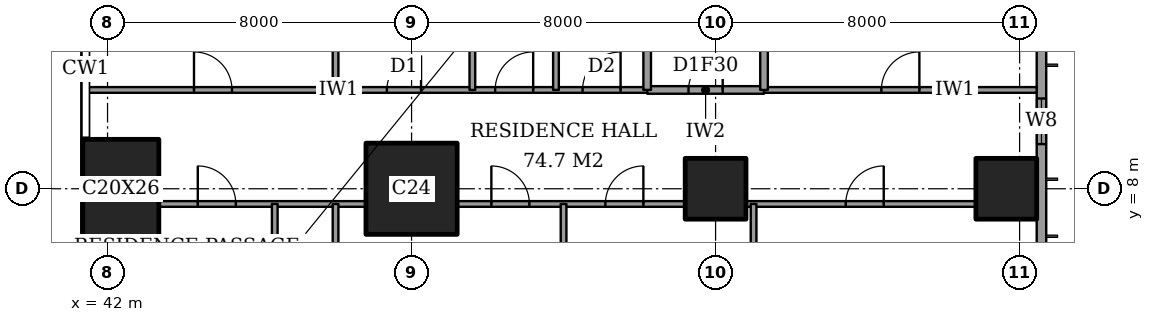
"""IFC4 building model, lengths in metres.
Left out: names, types, materials, properties, quantities, classifications, styles, units other than length and angle.
Written with IfcOpenShell. Run it as: python <this file> out.ifc"""

import sys

from ifc_helpers import new_model, si_unit, direction, frame, frame_2d, origin, origin_2d, place, context, subcontext, project, spatial, rectangle, extrude, element, fill, save


model = new_model("IFC4")
c1 = context("Model", 3, precision=1e-05, world=origin(), true_north=direction((0.0, 1.0)))
c2 = subcontext(c1, "Body", "Model", "MODEL_VIEW")
j1 = project(units=[si_unit("LENGTHUNIT", "METRE"), si_unit("PLANEANGLEUNIT", "RADIAN")], contexts=[c1])
p1 = place(None, origin())
s1 = spatial("IfcSite", under=j1, at=p1, CompositionType="ELEMENT")
p2 = place(p1, origin())
s2 = spatial("IfcBuilding", under=s1, at=p2, CompositionType="ELEMENT")
p3 = place(p2, frame((0.0, 0.0, 262.8)))
s3 = spatial("IfcBuildingStorey", under=s2, at=p3, CompositionType="ELEMENT", Elevation=262.8)
p4 = place(p3, frame((42.35, 8.0, 0.0), z_axis=(0.0, 0.0, 1.0), x_axis=(1.0, 0.0, 0.0)))
e1 = element("IfcColumn", 1, at=p4, inside=s3, PredefinedType="COLUMN", context=c2, shape_type="SweptSolid", body=[
    extrude(rectangle(XDim=2.0, YDim=2.6, at=origin_2d()), origin(), (0.0, 0.0, 1.0), 3.6),
])
p5 = place(p3, frame((50.0, 8.0, 0.0), z_axis=(0.0, 0.0, 1.0), x_axis=(1.0, 0.0, 0.0)))
e2 = element("IfcColumn", 2, at=p5, inside=s3, PredefinedType="COLUMN", context=c2, shape_type="SweptSolid", body=[
    extrude(rectangle(XDim=2.4, YDim=2.4, at=origin_2d()), origin(), (0.0, 0.0, 1.0), 3.6),
])
for number, where, z_axis, x_axis in (
    (3, (58.0, 8.0, 0.0), (0.0, 0.0, 1.0), (1.0, 0.0, 0.0)),
    (4, (65.65, 8.0, 0.0), (0.0, 0.0, 1.0), (1.0, 0.0, 0.0)),
):
    element("IfcColumn", number, at=place(p3, frame(where, z_axis=z_axis, x_axis=x_axis)), inside=s3, PredefinedType="COLUMN", context=c2, shape_type="SweptSolid", body=[
        extrude(rectangle(XDim=1.6, YDim=1.6, at=origin_2d()), origin(), (0.0, 0.0, 1.0), 3.6),
    ])
p6 = place(p3, frame((66.575, 3.175, 0.0), z_axis=(0.0, 0.0, 1.0), x_axis=(0.0, 1.0, 0.0)))
e5 = element("IfcWall", 5, at=p6, inside=s3, PredefinedType="SOLIDWALL", context=c2, shape_type="SweptSolid", body=[
    extrude(rectangle(XDim=41.65, YDim=0.25, at=frame_2d((20.825, 0.0))), origin(), (0.0, 0.0, 1.0), 3.6),
])
p7 = place(p6, frame((0.875, 0.0, 0.6)))
e6 = element("IfcOpeningElement", 6, at=p7, cuts=e5, PredefinedType="OPENING", context=c2, shape_type="SweptSolid", body=[
    extrude(rectangle(XDim=2.4, YDim=2.0, at=frame_2d((1.2, 1.0))), frame((0.0, 0.135, 0.0), z_axis=(0.0, -1.0, 0.0), x_axis=(1.0, 0.0, 0.0)), (0.0, 0.0, 1.0), 0.27),
])
p8 = place(p6, frame((6.0, 0.0, 0.6)))
e7 = element("IfcOpeningElement", 7, at=p8, cuts=e5, PredefinedType="OPENING", context=c2, shape_type="SweptSolid", body=[
    extrude(rectangle(XDim=1.2, YDim=2.0, at=frame_2d((0.6, 1.0))), frame((0.0, 0.135, 0.0), z_axis=(0.0, -1.0, 0.0), x_axis=(1.0, 0.0, 0.0)), (0.0, 0.0, 1.0), 0.27),
])
p9 = place(p6, frame((8.525, 0.0, 0.6)))
e8 = element("IfcOpeningElement", 8, at=p9, cuts=e5, PredefinedType="OPENING", context=c2, shape_type="SweptSolid", body=[
    extrude(rectangle(XDim=2.4, YDim=2.0, at=frame_2d((1.2, 1.0))), frame((0.0, 0.135, 0.0), z_axis=(0.0, -1.0, 0.0), x_axis=(1.0, 0.0, 0.0)), (0.0, 0.0, 1.0), 0.27),
])
p10 = place(p6, frame((15.625, 0.0, 0.6)))
e9 = element("IfcOpeningElement", 9, at=p10, cuts=e5, PredefinedType="OPENING", context=c2, shape_type="SweptSolid", body=[
    extrude(rectangle(XDim=2.4, YDim=2.0, at=frame_2d((1.2, 1.0))), frame((0.0, 0.135, 0.0), z_axis=(0.0, -1.0, 0.0), x_axis=(1.0, 0.0, 0.0)), (0.0, 0.0, 1.0), 0.27),
])
p11 = place(p6, frame((23.525, 0.0, 0.6)))
e10 = element("IfcOpeningElement", 10, at=p11, cuts=e5, PredefinedType="OPENING", context=c2, shape_type="SweptSolid", body=[
    extrude(rectangle(XDim=2.4, YDim=2.0, at=frame_2d((1.2, 1.0))), frame((0.0, 0.135, 0.0), z_axis=(0.0, -1.0, 0.0), x_axis=(1.0, 0.0, 0.0)), (0.0, 0.0, 1.0), 0.27),
])
p12 = place(p6, frame((30.625, 0.0, 0.6)))
e11 = element("IfcOpeningElement", 11, at=p12, cuts=e5, PredefinedType="OPENING", context=c2, shape_type="SweptSolid", body=[
    extrude(rectangle(XDim=2.4, YDim=2.0, at=frame_2d((1.2, 1.0))), frame((0.0, 0.135, 0.0), z_axis=(0.0, -1.0, 0.0), x_axis=(1.0, 0.0, 0.0)), (0.0, 0.0, 1.0), 0.27),
])
p13 = place(p6, frame((34.325, 0.0, 0.6)))
e12 = element("IfcOpeningElement", 12, at=p13, cuts=e5, PredefinedType="OPENING", context=c2, shape_type="SweptSolid", body=[
    extrude(rectangle(XDim=1.2, YDim=2.0, at=frame_2d((0.6, 1.0))), frame((0.0, 0.135, 0.0), z_axis=(0.0, -1.0, 0.0), x_axis=(1.0, 0.0, 0.0)), (0.0, 0.0, 1.0), 0.27),
])
p14 = place(p6, frame((38.375, 0.0, 0.6)))
e13 = element("IfcOpeningElement", 13, at=p14, cuts=e5, PredefinedType="OPENING", context=c2, shape_type="SweptSolid", body=[
    extrude(rectangle(XDim=2.4, YDim=2.0, at=frame_2d((1.2, 1.0))), frame((0.0, 0.135, 0.0), z_axis=(0.0, -1.0, 0.0), x_axis=(1.0, 0.0, 0.0)), (0.0, 0.0, 1.0), 0.27),
])
p15 = place(p3, frame((43.35, 7.6, 0.0), z_axis=(0.0, 0.0, 1.0), x_axis=(1.0, 0.0, 0.0)))
e14 = element("IfcWall", 14, at=p15, inside=s3, PredefinedType="PARTITIONING", context=c2, shape_type="SweptSolid", body=[
    extrude(rectangle(XDim=5.45, YDim=0.15, at=frame_2d((2.725, 0.0))), origin(), (0.0, 0.0, 1.0), 3.35),
])
p16 = place(p15, frame((1.025, 0.0, 0.0)))
e15 = element("IfcOpeningElement", 15, at=p16, cuts=e14, PredefinedType="OPENING", context=c2, shape_type="SweptSolid", body=[
    extrude(rectangle(XDim=1.0, YDim=2.1, at=frame_2d((0.5, 1.05))), frame((0.0, 0.085, 0.0), z_axis=(0.0, -1.0, 0.0), x_axis=(1.0, 0.0, 0.0)), (0.0, 0.0, 1.0), 0.17),
])
p17 = place(p3, frame((51.2, 7.6, 0.0), z_axis=(0.0, 0.0, 1.0), x_axis=(1.0, 0.0, 0.0)))
e16 = element("IfcWall", 16, at=p17, inside=s3, PredefinedType="PARTITIONING", context=c2, shape_type="SweptSolid", body=[
    extrude(rectangle(XDim=6.0, YDim=0.15, at=frame_2d((3.0, 0.0))), origin(), (0.0, 0.0, 1.0), 3.35),
])
p18 = place(p17, frame((3.9, 0.0, 0.0)))
e17 = element("IfcOpeningElement", 17, at=p18, cuts=e16, PredefinedType="OPENING", context=c2, shape_type="SweptSolid", body=[
    extrude(rectangle(XDim=1.0, YDim=2.1, at=frame_2d((0.5, 1.05))), frame((0.0, 0.085, 0.0), z_axis=(0.0, -1.0, 0.0), x_axis=(1.0, 0.0, 0.0)), (0.0, 0.0, 1.0), 0.17),
])
p19 = place(p17, frame((0.9, 0.0, 0.0)))
e18 = element("IfcOpeningElement", 18, at=p19, cuts=e16, PredefinedType="OPENING", context=c2, shape_type="SweptSolid", body=[
    extrude(rectangle(XDim=1.0, YDim=2.1, at=frame_2d((0.5, 1.05))), frame((0.0, 0.085, 0.0), z_axis=(0.0, -1.0, 0.0), x_axis=(1.0, 0.0, 0.0)), (0.0, 0.0, 1.0), 0.17),
])
p20 = place(p3, frame((58.8, 7.6, 0.0), z_axis=(0.0, 0.0, 1.0), x_axis=(1.0, 0.0, 0.0)))
e19 = element("IfcWall", 19, at=p20, inside=s3, PredefinedType="PARTITIONING", context=c2, shape_type="SweptSolid", body=[
    extrude(rectangle(XDim=6.05, YDim=0.15, at=frame_2d((3.025, 0.0))), origin(), (0.0, 0.0, 1.0), 3.35),
])
p21 = place(p20, frame((2.625, 0.0, 0.0)))
e20 = element("IfcOpeningElement", 20, at=p21, cuts=e19, PredefinedType="OPENING", context=c2, shape_type="SweptSolid", body=[
    extrude(rectangle(XDim=1.0, YDim=2.1, at=frame_2d((0.5, 1.05))), frame((0.0, 0.085, 0.0), z_axis=(0.0, -1.0, 0.0), x_axis=(1.0, 0.0, 0.0)), (0.0, 0.0, 1.0), 0.17),
])
p22 = place(p3, frame((56.2, 10.6, 0.0), z_axis=(0.0, 0.0, 1.0), x_axis=(1.0, 0.0, 0.0)))
e21 = element("IfcWall", 21, at=p22, inside=s3, PredefinedType="PARTITIONING", context=c2, shape_type="SweptSolid", body=[
    extrude(rectangle(XDim=3.075, YDim=0.2, at=frame_2d((1.538, 0.0))), origin(), (0.0, 0.0, 1.0), 3.35),
])
p23 = place(p22, frame((1.087, 0.0, 0.0)))
e22 = element("IfcOpeningElement", 22, at=p23, cuts=e21, PredefinedType="OPENING", context=c2, shape_type="SweptSolid", body=[
    extrude(rectangle(XDim=0.9, YDim=2.1, at=frame_2d((0.45, 1.05))), frame((0.0, 0.11, 0.0), z_axis=(0.0, -1.0, 0.0), x_axis=(1.0, 0.0, 0.0)), (0.0, 0.0, 1.0), 0.22),
])
p24 = place(p3, frame((41.439, 10.6, 0.0), z_axis=(0.0, 0.0, 1.0), x_axis=(1.0, 0.0, 0.0)))
e23 = element("IfcWall", 23, at=p24, inside=s3, PredefinedType="PARTITIONING", context=c2, shape_type="SweptSolid", body=[
    extrude(rectangle(XDim=14.761, YDim=0.15, at=frame_2d((7.38, 0.0))), origin(), (0.0, 0.0, 1.0), 3.35),
])
p25 = place(p24, frame((10.761, 0.0, 0.0)))
e24 = element("IfcOpeningElement", 24, at=p25, cuts=e23, PredefinedType="OPENING", context=c2, shape_type="SweptSolid", body=[
    extrude(rectangle(XDim=1.0, YDim=2.1, at=frame_2d((0.5, 1.05))), frame((0.0, 0.085, 0.0), z_axis=(0.0, -1.0, 0.0), x_axis=(1.0, 0.0, 0.0)), (0.0, 0.0, 1.0), 0.17),
])
p26 = place(p24, frame((13.061, 0.0, 0.0)))
e25 = element("IfcOpeningElement", 25, at=p26, cuts=e23, PredefinedType="OPENING", context=c2, shape_type="SweptSolid", body=[
    extrude(rectangle(XDim=1.0, YDim=2.1, at=frame_2d((0.5, 1.05))), frame((0.0, 0.085, 0.0), z_axis=(0.0, -1.0, 0.0), x_axis=(1.0, 0.0, 0.0)), (0.0, 0.0, 1.0), 0.17),
])
p27 = place(p24, frame((7.911, 0.0, 0.0)))
e26 = element("IfcOpeningElement", 26, at=p27, cuts=e23, PredefinedType="OPENING", context=c2, shape_type="SweptSolid", body=[
    extrude(rectangle(XDim=0.9, YDim=2.1, at=frame_2d((0.45, 1.05))), frame((0.0, 0.085, 0.0), z_axis=(0.0, -1.0, 0.0), x_axis=(1.0, 0.0, 0.0)), (0.0, 0.0, 1.0), 0.17),
])
p28 = place(p24, frame((2.836, 0.0, 0.0)))
e27 = element("IfcOpeningElement", 27, at=p28, cuts=e23, PredefinedType="OPENING", context=c2, shape_type="SweptSolid", body=[
    extrude(rectangle(XDim=1.0, YDim=2.1, at=frame_2d((0.5, 1.05))), frame((0.0, 0.085, 0.0), z_axis=(0.0, -1.0, 0.0), x_axis=(1.0, 0.0, 0.0)), (0.0, 0.0, 1.0), 0.17),
])
p29 = place(p3, frame((59.275, 10.6, 0.0), z_axis=(0.0, 0.0, 1.0), x_axis=(1.0, 0.0, 0.0)))
e28 = element("IfcWall", 28, at=p29, inside=s3, PredefinedType="PARTITIONING", context=c2, shape_type="SweptSolid", body=[
    extrude(rectangle(XDim=7.175, YDim=0.15, at=frame_2d((3.587, 0.0))), origin(), (0.0, 0.0, 1.0), 3.35),
])
p30 = place(p29, frame((3.087, 0.0, 0.0)))
e29 = element("IfcOpeningElement", 29, at=p30, cuts=e28, PredefinedType="OPENING", context=c2, shape_type="SweptSolid", body=[
    extrude(rectangle(XDim=1.0, YDim=2.1, at=frame_2d((0.5, 1.05))), frame((0.0, 0.085, 0.0), z_axis=(0.0, -1.0, 0.0), x_axis=(1.0, 0.0, 0.0)), (0.0, 0.0, 1.0), 0.17),
])
p31 = place(p3, frame((46.4, -0.45, 0.0), z_axis=(0.0, 0.0, 1.0), x_axis=(0.0, 1.0, 0.0)))
e30 = element("IfcWall", 30, at=p31, inside=s3, PredefinedType="PARTITIONING", context=c2, shape_type="SweptSolid", body=[
    extrude(rectangle(XDim=8.05, YDim=0.15, at=frame_2d((4.025, 0.0))), origin(), (0.0, 0.0, 1.0), 3.35),
])
p32 = place(p31, frame((3.575, 0.0, 0.0)))
e31 = element("IfcOpeningElement", 31, at=p32, cuts=e30, PredefinedType="OPENING", context=c2, shape_type="SweptSolid", body=[
    extrude(rectangle(XDim=0.9, YDim=2.1, at=frame_2d((0.45, 1.05))), frame((0.0, 0.085, 0.0), z_axis=(0.0, -1.0, 0.0), x_axis=(1.0, 0.0, 0.0)), (0.0, 0.0, 1.0), 0.17),
])
p33 = place(p3, frame((48.0, -0.45, 0.0), z_axis=(0.0, 0.0, 1.0), x_axis=(0.0, 1.0, 0.0)))
e32 = element("IfcWall", 32, at=p33, inside=s3, PredefinedType="PARTITIONING", context=c2, shape_type="SweptSolid", body=[
    extrude(rectangle(XDim=8.05, YDim=0.15, at=frame_2d((4.025, 0.0))), origin(), (0.0, 0.0, 1.0), 3.35),
])
for number, where, z_axis, x_axis in (
    (33, (48.0, 10.6, 0.0), (0.0, 0.0, 1.0), (0.0, 1.0, 0.0)),
    (34, (51.6, 10.6, 0.0), (0.0, 0.0, 1.0), (0.0, 1.0, 0.0)),
    (35, (53.8, 10.6, 0.0), (0.0, 0.0, 1.0), (0.0, 1.0, 0.0)),
):
    element("IfcWall", number, at=place(p3, frame(where, z_axis=z_axis, x_axis=x_axis)), inside=s3, PredefinedType="PARTITIONING", context=c2, shape_type="SweptSolid", body=[
        extrude(rectangle(XDim=5.9, YDim=0.15, at=frame_2d((2.95, 0.0))), origin(), (0.0, 0.0, 1.0), 3.35),
    ])
p34 = place(p3, frame((54.0, -0.45, 0.0), z_axis=(0.0, 0.0, 1.0), x_axis=(0.0, 1.0, 0.0)))
e36 = element("IfcWall", 36, at=p34, inside=s3, PredefinedType="PARTITIONING", context=c2, shape_type="SweptSolid", body=[
    extrude(rectangle(XDim=8.05, YDim=0.15, at=frame_2d((4.025, 0.0))), origin(), (0.0, 0.0, 1.0), 3.35),
])
p35 = place(p3, frame((56.2, 10.6, 0.0), z_axis=(0.0, 0.0, 1.0), x_axis=(0.0, 1.0, 0.0)))
e37 = element("IfcWall", 37, at=p35, inside=s3, PredefinedType="PARTITIONING", context=c2, shape_type="SweptSolid", body=[
    extrude(rectangle(XDim=3.2, YDim=0.2, at=frame_2d((1.6, 0.0))), origin(), (0.0, 0.0, 1.0), 3.35),
])
p36 = place(p3, frame((59.0, -0.45, 0.0), z_axis=(0.0, 0.0, 1.0), x_axis=(0.0, 1.0, 0.0)))
e38 = element("IfcWall", 38, at=p36, inside=s3, PredefinedType="PARTITIONING", context=c2, shape_type="SweptSolid", body=[
    extrude(rectangle(XDim=8.05, YDim=0.15, at=frame_2d((4.025, 0.0))), origin(), (0.0, 0.0, 1.0), 3.35),
])
p37 = place(p3, frame((59.275, 10.6, 0.0), z_axis=(0.0, 0.0, 1.0), x_axis=(0.0, 1.0, 0.0)))
e39 = element("IfcWall", 39, at=p37, inside=s3, PredefinedType="PARTITIONING", context=c2, shape_type="SweptSolid", body=[
    extrude(rectangle(XDim=3.2, YDim=0.2, at=frame_2d((1.6, 0.0))), origin(), (0.0, 0.0, 1.0), 3.35),
])
p38 = place(p8, origin())
e40 = element("IfcWindow", 40, at=p38, inside=s3, PartitioningType="SINGLE_PANEL", PredefinedType="WINDOW", context=c2, shape_type="SweptSolid", body=[
    extrude(rectangle(XDim=1.2, YDim=2.0, at=frame_2d((0.6, 1.0))), frame((0.0, 0.03, 0.0), z_axis=(0.0, -1.0, 0.0), x_axis=(1.0, 0.0, 0.0)), (0.0, 0.0, 1.0), 0.06),
])
fill(e7, e40)
p39 = place(p21, origin())
e41 = element("IfcDoor", 41, at=p39, inside=s3, OperationType="SINGLE_SWING_LEFT", PredefinedType="DOOR", context=c2, shape_type="SweptSolid", body=[
    extrude(rectangle(XDim=1.0, YDim=2.1, at=frame_2d((0.5, 1.05))), frame((0.0, 0.025, 0.0), z_axis=(0.0, -1.0, 0.0), x_axis=(1.0, 0.0, 0.0)), (0.0, 0.0, 1.0), 0.05),
])
fill(e20, e41)
p40 = place(p18, origin())
e42 = element("IfcDoor", 42, at=p40, inside=s3, OperationType="SINGLE_SWING_LEFT", PredefinedType="DOOR", context=c2, shape_type="SweptSolid", body=[
    extrude(rectangle(XDim=1.0, YDim=2.1, at=frame_2d((0.5, 1.05))), frame((0.0, 0.025, 0.0), z_axis=(0.0, -1.0, 0.0), x_axis=(1.0, 0.0, 0.0)), (0.0, 0.0, 1.0), 0.05),
])
fill(e17, e42)
p41 = place(p19, origin())
e43 = element("IfcDoor", 43, at=p41, inside=s3, OperationType="SINGLE_SWING_RIGHT", PredefinedType="DOOR", context=c2, shape_type="SweptSolid", body=[
    extrude(rectangle(XDim=1.0, YDim=2.1, at=frame_2d((0.5, 1.05))), frame((0.0, 0.025, 0.0), z_axis=(0.0, -1.0, 0.0), x_axis=(1.0, 0.0, 0.0)), (0.0, 0.0, 1.0), 0.05),
])
fill(e18, e43)
p42 = place(p16, origin())
e44 = element("IfcDoor", 44, at=p42, inside=s3, OperationType="SINGLE_SWING_RIGHT", PredefinedType="DOOR", context=c2, shape_type="SweptSolid", body=[
    extrude(rectangle(XDim=1.0, YDim=2.1, at=frame_2d((0.5, 1.05))), frame((0.0, 0.025, 0.0), z_axis=(0.0, -1.0, 0.0), x_axis=(1.0, 0.0, 0.0)), (0.0, 0.0, 1.0), 0.05),
])
fill(e15, e44)
p43 = place(p25, origin())
e45 = element("IfcDoor", 45, at=p43, inside=s3, OperationType="SINGLE_SWING_LEFT", PredefinedType="DOOR", context=c2, shape_type="SweptSolid", body=[
    extrude(rectangle(XDim=1.0, YDim=2.1, at=frame_2d((0.5, 1.05))), frame((0.0, 0.025, 0.0), z_axis=(0.0, -1.0, 0.0), x_axis=(1.0, 0.0, 0.0)), (0.0, 0.0, 1.0), 0.05),
])
fill(e24, e45)
p44 = place(p30, origin())
e46 = element("IfcDoor", 46, at=p44, inside=s3, OperationType="SINGLE_SWING_LEFT", PredefinedType="DOOR", context=c2, shape_type="SweptSolid", body=[
    extrude(rectangle(XDim=1.0, YDim=2.1, at=frame_2d((0.5, 1.05))), frame((0.0, 0.025, 0.0), z_axis=(0.0, -1.0, 0.0), x_axis=(1.0, 0.0, 0.0)), (0.0, 0.0, 1.0), 0.05),
])
fill(e29, e46)
p45 = place(p23, origin())
e47 = element("IfcDoor", 47, at=p45, inside=s3, OperationType="SINGLE_SWING_LEFT", PredefinedType="DOOR", context=c2, shape_type="SweptSolid", body=[
    extrude(rectangle(XDim=0.9, YDim=2.1, at=frame_2d((0.45, 1.05))), frame((0.0, 0.025, 0.0), z_axis=(0.0, -1.0, 0.0), x_axis=(1.0, 0.0, 0.0)), (0.0, 0.0, 1.0), 0.05),
])
fill(e22, e47)
p46 = place(p26, origin())
e48 = element("IfcDoor", 48, at=p46, inside=s3, OperationType="SINGLE_SWING_LEFT", PredefinedType="DOOR", context=c2, shape_type="SweptSolid", body=[
    extrude(rectangle(XDim=1.0, YDim=2.1, at=frame_2d((0.5, 1.05))), frame((0.0, 0.025, 0.0), z_axis=(0.0, -1.0, 0.0), x_axis=(1.0, 0.0, 0.0)), (0.0, 0.0, 1.0), 0.05),
])
fill(e25, e48)
p47 = place(p27, origin())
e49 = element("IfcDoor", 49, at=p47, inside=s3, OperationType="SINGLE_SWING_LEFT", PredefinedType="DOOR", context=c2, shape_type="SweptSolid", body=[
    extrude(rectangle(XDim=0.9, YDim=2.1, at=frame_2d((0.45, 1.05))), frame((0.0, 0.025, 0.0), z_axis=(0.0, -1.0, 0.0), x_axis=(1.0, 0.0, 0.0)), (0.0, 0.0, 1.0), 0.05),
])
fill(e26, e49)
p48 = place(p28, origin())
e50 = element("IfcDoor", 50, at=p48, inside=s3, OperationType="SINGLE_SWING_RIGHT", PredefinedType="DOOR", context=c2, shape_type="SweptSolid", body=[
    extrude(rectangle(XDim=1.0, YDim=2.1, at=frame_2d((0.5, 1.05))), frame((0.0, 0.025, 0.0), z_axis=(0.0, -1.0, 0.0), x_axis=(1.0, 0.0, 0.0)), (0.0, 0.0, 1.0), 0.05),
])
fill(e27, e50)
save(model, sys.argv[1])
